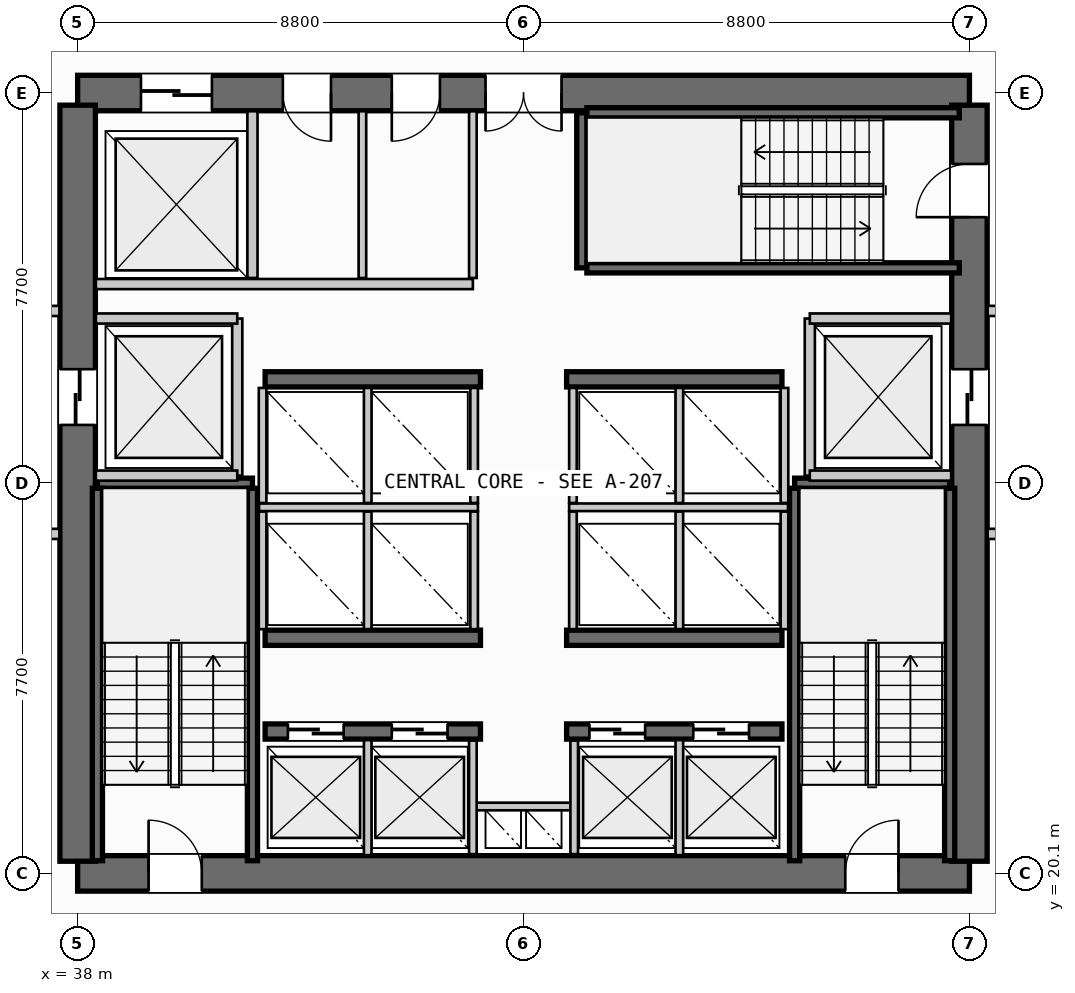
"""IFC4 building model, lengths in metres.
Left out: names, types, materials, properties, quantities, classifications, styles, units other than length and angle.
Written with IfcOpenShell. Run it as: python <this file> out.ifc"""

import sys

from ifc_helpers import new_model, si_unit, direction, frame, frame_2d, origin, place, context, subcontext, project, spatial, rectangle, extrude, source, transform, mapped, element, fill, save


model = new_model("IFC4")
c1 = context("Model", 3, precision=1e-05, world=origin(), true_north=direction((0.0, 1.0)))
c2 = subcontext(c1, "Body", "Model", "MODEL_VIEW")
j1 = project(units=[si_unit("LENGTHUNIT", "METRE"), si_unit("PLANEANGLEUNIT", "RADIAN")], contexts=[c1])
p1 = place(None, origin())
s1 = spatial("IfcSite", under=j1, at=p1, CompositionType="ELEMENT")
p2 = place(p1, origin())
s2 = spatial("IfcBuilding", under=s1, at=p2, CompositionType="ELEMENT")
p3 = place(p2, frame((0.0, 0.0, 44.8)))
s3 = spatial("IfcBuildingStorey", under=s2, at=p3, CompositionType="ELEMENT", Elevation=44.8)
p4 = place(p3, frame((38.0, 20.1, 0.0), z_axis=(0.0, 0.0, 1.0), x_axis=(1.0, 0.0, 0.0)))
e1 = element("IfcWall", 1, at=p4, inside=s3, PredefinedType="SHEAR", context=c2, shape_type="SweptSolid", body=[
    extrude(rectangle(XDim=17.6, YDim=0.7, at=frame_2d((8.8, 0.0))), origin(), (0.0, 0.0, 1.0), 3.55),
])
p5 = place(p4, frame((1.4, 0.0, 0.0)))
e2 = element("IfcOpeningElement", 2, at=p5, cuts=e1, PredefinedType="OPENING", context=c2, shape_type="SweptSolid", body=[
    extrude(rectangle(XDim=1.05, YDim=2.15, at=frame_2d((0.525, 1.075))), frame((0.0, 0.36, 0.0), z_axis=(0.0, -1.0, 0.0), x_axis=(1.0, 0.0, 0.0)), (0.0, 0.0, 1.0), 0.72),
])
p6 = place(p4, frame((15.15, 0.0, 0.0)))
e3 = element("IfcOpeningElement", 3, at=p6, cuts=e1, PredefinedType="OPENING", context=c2, shape_type="SweptSolid", body=[
    extrude(rectangle(XDim=1.05, YDim=2.15, at=frame_2d((0.525, 1.075))), frame((0.0, 0.36, 0.0), z_axis=(0.0, -1.0, 0.0), x_axis=(1.0, 0.0, 0.0)), (0.0, 0.0, 1.0), 0.72),
])
p7 = place(p3, frame((55.6, 35.5, 0.0), z_axis=(0.0, 0.0, 1.0), x_axis=(-1.0, 0.0, 0.0)))
e4 = element("IfcWall", 4, at=p7, inside=s3, PredefinedType="SHEAR", context=c2, shape_type="SweptSolid", body=[
    extrude(rectangle(XDim=17.6, YDim=0.7, at=frame_2d((8.8, 0.0))), origin(), (0.0, 0.0, 1.0), 3.55),
])
p8 = place(p7, frame((8.05, 0.0, 0.0)))
e5 = element("IfcOpeningElement", 5, at=p8, cuts=e4, PredefinedType="OPENING", context=c2, shape_type="SweptSolid", body=[
    extrude(rectangle(XDim=1.5, YDim=2.2, at=frame_2d((0.75, 1.1))), frame((0.0, 0.36, 0.0), z_axis=(0.0, -1.0, 0.0), x_axis=(1.0, 0.0, 0.0)), (0.0, 0.0, 1.0), 0.72),
])
p9 = place(p7, frame((14.95, 0.0, 0.0)))
e6 = element("IfcOpeningElement", 6, at=p9, cuts=e4, PredefinedType="OPENING", context=c2, shape_type="SweptSolid", body=[
    extrude(rectangle(XDim=1.4, YDim=2.3, at=frame_2d((0.7, 1.15))), frame((0.0, 0.36, 0.0), z_axis=(0.0, -1.0, 0.0), x_axis=(1.0, 0.0, 0.0)), (0.0, 0.0, 1.0), 0.72),
])
p10 = place(p7, frame((12.6, 0.0, 0.0)))
e7 = element("IfcOpeningElement", 7, at=p10, cuts=e4, PredefinedType="OPENING", context=c2, shape_type="SweptSolid", body=[
    extrude(rectangle(XDim=0.95, YDim=2.15, at=frame_2d((0.475, 1.075))), frame((0.0, 0.36, 0.0), z_axis=(0.0, -1.0, 0.0), x_axis=(1.0, 0.0, 0.0)), (0.0, 0.0, 1.0), 0.72),
])
p11 = place(p7, frame((10.45, 0.0, 0.0)))
e8 = element("IfcOpeningElement", 8, at=p11, cuts=e4, PredefinedType="OPENING", context=c2, shape_type="SweptSolid", body=[
    extrude(rectangle(XDim=0.95, YDim=2.15, at=frame_2d((0.475, 1.075))), frame((0.0, 0.36, 0.0), z_axis=(0.0, -1.0, 0.0), x_axis=(1.0, 0.0, 0.0)), (0.0, 0.0, 1.0), 0.72),
])
p12 = place(p3, frame((38.0, 35.26, 0.0), z_axis=(0.0, 0.0, 1.0), x_axis=(0.0, -1.0, 0.0)))
e9 = element("IfcWall", 9, at=p12, inside=s3, PredefinedType="SHEAR", context=c2, shape_type="SweptSolid", body=[
    extrude(rectangle(XDim=14.92, YDim=0.7, at=frame_2d((7.46, 0.0))), origin(), (0.0, 0.0, 1.0), 3.55),
])
p13 = place(p12, frame((5.21, 0.0, 0.0)))
e10 = element("IfcOpeningElement", 10, at=p13, cuts=e9, PredefinedType="OPENING", context=c2, shape_type="SweptSolid", body=[
    extrude(rectangle(XDim=1.1, YDim=2.2, at=frame_2d((0.55, 1.1))), frame((0.0, 0.36, 0.0), z_axis=(0.0, -1.0, 0.0), x_axis=(1.0, 0.0, 0.0)), (0.0, 0.0, 1.0), 0.72),
])
p14 = place(p3, frame((55.6, 20.34, 0.0), z_axis=(0.0, 0.0, 1.0), x_axis=(0.0, 1.0, 0.0)))
e11 = element("IfcWall", 11, at=p14, inside=s3, PredefinedType="SHEAR", context=c2, shape_type="SweptSolid", body=[
    extrude(rectangle(XDim=14.92, YDim=0.7, at=frame_2d((7.46, 0.0))), origin(), (0.0, 0.0, 1.0), 3.55),
])
p15 = place(p14, frame((12.71, 0.0, 0.0)))
e12 = element("IfcOpeningElement", 12, at=p15, cuts=e11, PredefinedType="OPENING", context=c2, shape_type="SweptSolid", body=[
    extrude(rectangle(XDim=1.05, YDim=2.15, at=frame_2d((0.525, 1.075))), frame((0.0, 0.36, 0.0), z_axis=(0.0, -1.0, 0.0), x_axis=(1.0, 0.0, 0.0)), (0.0, 0.0, 1.0), 0.72),
])
p16 = place(p14, frame((8.61, 0.0, 0.0)))
e13 = element("IfcOpeningElement", 13, at=p16, cuts=e11, PredefinedType="OPENING", context=c2, shape_type="SweptSolid", body=[
    extrude(rectangle(XDim=1.1, YDim=2.2, at=frame_2d((0.55, 1.1))), frame((0.0, 0.36, 0.0), z_axis=(0.0, -1.0, 0.0), x_axis=(1.0, 0.0, 0.0)), (0.0, 0.0, 1.0), 0.72),
])
p17 = place(p3, frame((41.7, 22.9, 0.0), z_axis=(0.0, 0.0, 1.0), x_axis=(1.0, 0.0, 0.0)))
e14 = element("IfcWall", 14, at=p17, inside=s3, PredefinedType="SHEAR", context=c2, shape_type="SweptSolid", body=[
    extrude(rectangle(XDim=4.25, YDim=0.3, at=frame_2d((2.125, 0.0))), origin(), (0.0, 0.0, 1.0), 3.55),
])
p18 = place(p17, frame((0.45, 0.0, 0.0)))
e15 = element("IfcOpeningElement", 15, at=p18, cuts=e14, PredefinedType="OPENING", context=c2, shape_type="SweptSolid", body=[
    extrude(rectangle(XDim=1.1, YDim=2.2, at=frame_2d((0.55, 1.1))), frame((0.0, 0.16, 0.0), z_axis=(0.0, -1.0, 0.0), x_axis=(1.0, 0.0, 0.0)), (0.0, 0.0, 1.0), 0.32),
])
p19 = place(p17, frame((2.5, 0.0, 0.0)))
e16 = element("IfcOpeningElement", 16, at=p19, cuts=e14, PredefinedType="OPENING", context=c2, shape_type="SweptSolid", body=[
    extrude(rectangle(XDim=1.1, YDim=2.2, at=frame_2d((0.55, 1.1))), frame((0.0, 0.16, 0.0), z_axis=(0.0, -1.0, 0.0), x_axis=(1.0, 0.0, 0.0)), (0.0, 0.0, 1.0), 0.32),
])
p20 = place(p3, frame((47.65, 22.9, 0.0), z_axis=(0.0, 0.0, 1.0), x_axis=(1.0, 0.0, 0.0)))
e17 = element("IfcWall", 17, at=p20, inside=s3, PredefinedType="SHEAR", context=c2, shape_type="SweptSolid", body=[
    extrude(rectangle(XDim=4.25, YDim=0.3, at=frame_2d((2.125, 0.0))), origin(), (0.0, 0.0, 1.0), 3.55),
])
p21 = place(p20, frame((0.45, 0.0, 0.0)))
e18 = element("IfcOpeningElement", 18, at=p21, cuts=e17, PredefinedType="OPENING", context=c2, shape_type="SweptSolid", body=[
    extrude(rectangle(XDim=1.1, YDim=2.2, at=frame_2d((0.55, 1.1))), frame((0.0, 0.16, 0.0), z_axis=(0.0, -1.0, 0.0), x_axis=(1.0, 0.0, 0.0)), (0.0, 0.0, 1.0), 0.32),
])
p22 = place(p20, frame((2.5, 0.0, 0.0)))
e19 = element("IfcOpeningElement", 19, at=p22, cuts=e17, PredefinedType="OPENING", context=c2, shape_type="SweptSolid", body=[
    extrude(rectangle(XDim=1.1, YDim=2.2, at=frame_2d((0.55, 1.1))), frame((0.0, 0.16, 0.0), z_axis=(0.0, -1.0, 0.0), x_axis=(1.0, 0.0, 0.0)), (0.0, 0.0, 1.0), 0.32),
])
for number, where, z_axis, x_axis in (
    (20, (41.7, 24.75, 0.0), (0.0, 0.0, 1.0), (1.0, 0.0, 0.0)),
    (21, (47.65, 24.75, 0.0), (0.0, 0.0, 1.0), (1.0, 0.0, 0.0)),
    (22, (41.7, 29.85, 0.0), (0.0, 0.0, 1.0), (1.0, 0.0, 0.0)),
    (23, (47.65, 29.85, 0.0), (0.0, 0.0, 1.0), (1.0, 0.0, 0.0)),
):
    element("IfcWall", number, at=place(p3, frame(where, z_axis=z_axis, x_axis=x_axis)), inside=s3, PredefinedType="SHEAR", context=c2, shape_type="SweptSolid", body=[
        extrude(rectangle(XDim=4.25, YDim=0.3, at=frame_2d((2.125, 0.0))), origin(), (0.0, 0.0, 1.0), 3.55),
    ])
p23 = place(p3, frame((38.39, 27.8, 0.0), z_axis=(0.0, 0.0, 1.0), x_axis=(1.0, 0.0, 0.0)))
e24 = element("IfcWall", 24, at=p23, inside=s3, PredefinedType="SHEAR", context=c2, shape_type="SweptSolid", body=[
    extrude(rectangle(XDim=3.06, YDim=0.2, at=frame_2d((1.53, 0.0))), origin(), (0.0, 0.0, 1.0), 3.55),
])
for number, where, z_axis, x_axis in (
    (25, (41.45, 27.7, 0.0), (0.0, 0.0, 1.0), (0.0, -1.0, 0.0)),
    (26, (38.39, 20.35, 0.0), (0.0, 0.0, 1.0), (0.0, 1.0, 0.0)),
):
    element("IfcWall", number, at=place(p3, frame(where, z_axis=z_axis, x_axis=x_axis)), inside=s3, PredefinedType="SHEAR", context=c2, shape_type="SweptSolid", body=[
        extrude(rectangle(XDim=7.35, YDim=0.2, at=frame_2d((3.675, 0.0))), origin(), (0.0, 0.0, 1.0), 3.55),
    ])
p24 = place(p3, frame((52.15, 27.8, 0.0), z_axis=(0.0, 0.0, 1.0), x_axis=(1.0, 0.0, 0.0)))
e27 = element("IfcWall", 27, at=p24, inside=s3, PredefinedType="SHEAR", context=c2, shape_type="SweptSolid", body=[
    extrude(rectangle(XDim=3.06, YDim=0.2, at=frame_2d((1.53, 0.0))), origin(), (0.0, 0.0, 1.0), 3.55),
])
for number, where, z_axis, x_axis in (
    (28, (55.21, 27.7, 0.0), (0.0, 0.0, 1.0), (0.0, -1.0, 0.0)),
    (29, (52.15, 20.35, 0.0), (0.0, 0.0, 1.0), (0.0, 1.0, 0.0)),
):
    element("IfcWall", number, at=place(p3, frame(where, z_axis=z_axis, x_axis=x_axis)), inside=s3, PredefinedType="SHEAR", context=c2, shape_type="SweptSolid", body=[
        extrude(rectangle(XDim=7.35, YDim=0.2, at=frame_2d((3.675, 0.0))), origin(), (0.0, 0.0, 1.0), 3.55),
    ])
p25 = place(p3, frame((47.95, 32.05, 0.0), z_axis=(0.0, 0.0, 1.0), x_axis=(0.0, 1.0, 0.0)))
e30 = element("IfcWall", 30, at=p25, inside=s3, PredefinedType="SHEAR", context=c2, shape_type="SweptSolid", body=[
    extrude(rectangle(XDim=3.06, YDim=0.2, at=frame_2d((1.53, 0.0))), origin(), (0.0, 0.0, 1.0), 3.55),
])
for number, where, z_axis, x_axis in (
    (31, (48.05, 35.11, 0.0), (0.0, 0.0, 1.0), (1.0, 0.0, 0.0)),
    (32, (55.4, 32.05, 0.0), (0.0, 0.0, 1.0), (-1.0, 0.0, 0.0)),
):
    element("IfcWall", number, at=place(p3, frame(where, z_axis=z_axis, x_axis=x_axis)), inside=s3, PredefinedType="SHEAR", context=c2, shape_type="SweptSolid", body=[
        extrude(rectangle(XDim=7.35, YDim=0.2, at=frame_2d((3.675, 0.0))), origin(), (0.0, 0.0, 1.0), 3.55),
    ])
p26 = place(p3, frame((45.8, 21.42, 0.0), z_axis=(0.0, 0.0, 1.0), x_axis=(1.0, 0.0, 0.0)))
e33 = element("IfcWall", 33, at=p26, inside=s3, PredefinedType="PARTITIONING", context=c2, shape_type="SweptSolid", body=[
    extrude(rectangle(XDim=2.0, YDim=0.15, at=frame_2d((1.0, 0.0))), origin(), (0.0, 0.0, 1.0), 2.785),
])
for number, where, z_axis, x_axis in (
    (34, (45.8, 20.48, 0.0), (0.0, 0.0, 1.0), (0.0, 1.0, 0.0)),
    (35, (47.8, 20.48, 0.0), (0.0, 0.0, 1.0), (0.0, 1.0, 0.0)),
):
    element("IfcWall", number, at=place(p3, frame(where, z_axis=z_axis, x_axis=x_axis)), inside=s3, PredefinedType="PARTITIONING", context=c2, shape_type="SweptSolid", body=[
        extrude(rectangle(XDim=2.24, YDim=0.15, at=frame_2d((1.12, 0.0))), origin(), (0.0, 0.0, 1.0), 2.785),
    ])
p27 = place(p3, frame((41.15, 27.95, 0.0), z_axis=(0.0, 0.0, 1.0), x_axis=(0.0, 1.0, 0.0)))
e36 = element("IfcWall", 36, at=p27, inside=s3, PredefinedType="PARTITIONING", context=c2, shape_type="SweptSolid", body=[
    extrude(rectangle(XDim=3.1, YDim=0.2, at=frame_2d((1.55, 0.0))), origin(), (0.0, 0.0, 1.0), 2.785),
])
for number, where, z_axis, x_axis in (
    (37, (38.36, 27.95, 0.0), (0.0, 0.0, 1.0), (1.0, 0.0, 0.0)),
    (38, (38.36, 31.05, 0.0), (0.0, 0.0, 1.0), (1.0, 0.0, 0.0)),
):
    element("IfcWall", number, at=place(p3, frame(where, z_axis=z_axis, x_axis=x_axis)), inside=s3, PredefinedType="PARTITIONING", context=c2, shape_type="SweptSolid", body=[
        extrude(rectangle(XDim=2.79, YDim=0.2, at=frame_2d((1.395, 0.0))), origin(), (0.0, 0.0, 1.0), 2.785),
    ])
for number, where, z_axis, x_axis in (
    (39, (34.5, 26.8, 0.0), (0.0, 0.0, 1.0), (1.0, 0.0, 0.0)),
    (40, (34.5, 31.2, 0.0), (0.0, 0.0, 1.0), (1.0, 0.0, 0.0)),
):
    element("IfcWall", number, at=place(p3, frame(where, z_axis=z_axis, x_axis=x_axis)), inside=s3, PredefinedType="PARTITIONING", context=c2, shape_type="SweptSolid", body=[
        extrude(rectangle(XDim=3.14, YDim=0.2, at=frame_2d((1.57, 0.0))), origin(), (0.0, 0.0, 1.0), 2.785),
    ])
p28 = place(p3, frame((52.45, 27.95, 0.0), z_axis=(0.0, 0.0, 1.0), x_axis=(0.0, 1.0, 0.0)))
e41 = element("IfcWall", 41, at=p28, inside=s3, PredefinedType="PARTITIONING", context=c2, shape_type="SweptSolid", body=[
    extrude(rectangle(XDim=3.1, YDim=0.2, at=frame_2d((1.55, 0.0))), origin(), (0.0, 0.0, 1.0), 2.785),
])
for number, where, z_axis, x_axis in (
    (42, (52.45, 27.95, 0.0), (0.0, 0.0, 1.0), (1.0, 0.0, 0.0)),
    (43, (52.45, 31.05, 0.0), (0.0, 0.0, 1.0), (1.0, 0.0, 0.0)),
):
    element("IfcWall", number, at=place(p3, frame(where, z_axis=z_axis, x_axis=x_axis)), inside=s3, PredefinedType="PARTITIONING", context=c2, shape_type="SweptSolid", body=[
        extrude(rectangle(XDim=2.79, YDim=0.2, at=frame_2d((1.395, 0.0))), origin(), (0.0, 0.0, 1.0), 2.785),
    ])
for number, where, z_axis, x_axis in (
    (44, (55.96, 26.8, 0.0), (0.0, 0.0, 1.0), (1.0, 0.0, 0.0)),
    (45, (55.96, 31.2, 0.0), (0.0, 0.0, 1.0), (1.0, 0.0, 0.0)),
):
    element("IfcWall", number, at=place(p3, frame(where, z_axis=z_axis, x_axis=x_axis)), inside=s3, PredefinedType="PARTITIONING", context=c2, shape_type="SweptSolid", body=[
        extrude(rectangle(XDim=3.14, YDim=0.2, at=frame_2d((1.57, 0.0))), origin(), (0.0, 0.0, 1.0), 2.785),
    ])
for number, where, z_axis, x_axis in (
    (46, (43.725, 20.46, 0.0), (0.0, 0.0, 1.0), (0.0, 1.0, 0.0)),
    (47, (49.875, 20.46, 0.0), (0.0, 0.0, 1.0), (0.0, 1.0, 0.0)),
):
    element("IfcWall", number, at=place(p3, frame(where, z_axis=z_axis, x_axis=x_axis)), inside=s3, PredefinedType="PARTITIONING", context=c2, shape_type="SweptSolid", body=[
        extrude(rectangle(XDim=2.27, YDim=0.15, at=frame_2d((1.135, 0.0))), origin(), (0.0, 0.0, 1.0), 2.785),
    ])
p29 = place(p3, frame((41.58, 27.325, 0.0), z_axis=(0.0, 0.0, 1.0), x_axis=(1.0, 0.0, 0.0)))
e48 = element("IfcWall", 48, at=p29, inside=s3, PredefinedType="PARTITIONING", context=c2, shape_type="SweptSolid", body=[
    extrude(rectangle(XDim=4.32, YDim=0.15, at=frame_2d((2.16, 0.0))), origin(), (0.0, 0.0, 1.0), 2.785),
])
p30 = place(p3, frame((47.7, 27.325, 0.0), z_axis=(0.0, 0.0, 1.0), x_axis=(1.0, 0.0, 0.0)))
e49 = element("IfcWall", 49, at=p30, inside=s3, PredefinedType="PARTITIONING", context=c2, shape_type="SweptSolid", body=[
    extrude(rectangle(XDim=4.32, YDim=0.15, at=frame_2d((2.16, 0.0))), origin(), (0.0, 0.0, 1.0), 2.785),
])
for number, where, z_axis, x_axis in (
    (50, (41.65, 24.92, 0.0), (0.0, 0.0, 1.0), (0.0, 1.0, 0.0)),
    (51, (43.725, 24.92, 0.0), (0.0, 0.0, 1.0), (0.0, 1.0, 0.0)),
    (52, (45.825, 24.92, 0.0), (0.0, 0.0, 1.0), (0.0, 1.0, 0.0)),
    (53, (47.775, 24.92, 0.0), (0.0, 0.0, 1.0), (0.0, 1.0, 0.0)),
    (54, (49.875, 24.92, 0.0), (0.0, 0.0, 1.0), (0.0, 1.0, 0.0)),
    (55, (51.95, 24.92, 0.0), (0.0, 0.0, 1.0), (0.0, 1.0, 0.0)),
):
    element("IfcWall", number, at=place(p3, frame(where, z_axis=z_axis, x_axis=x_axis)), inside=s3, PredefinedType="PARTITIONING", context=c2, shape_type="SweptSolid", body=[
        extrude(rectangle(XDim=2.32, YDim=0.15, at=frame_2d((1.16, 0.0))), origin(), (0.0, 0.0, 1.0), 2.785),
    ])
for number, where, z_axis, x_axis in (
    (56, (41.65, 27.41, 0.0), (0.0, 0.0, 1.0), (0.0, 1.0, 0.0)),
    (57, (43.725, 27.41, 0.0), (0.0, 0.0, 1.0), (0.0, 1.0, 0.0)),
    (58, (45.825, 27.41, 0.0), (0.0, 0.0, 1.0), (0.0, 1.0, 0.0)),
    (59, (47.775, 27.41, 0.0), (0.0, 0.0, 1.0), (0.0, 1.0, 0.0)),
    (60, (49.875, 27.41, 0.0), (0.0, 0.0, 1.0), (0.0, 1.0, 0.0)),
    (61, (51.95, 27.41, 0.0), (0.0, 0.0, 1.0), (0.0, 1.0, 0.0)),
):
    element("IfcWall", number, at=place(p3, frame(where, z_axis=z_axis, x_axis=x_axis)), inside=s3, PredefinedType="PARTITIONING", context=c2, shape_type="SweptSolid", body=[
        extrude(rectangle(XDim=2.27, YDim=0.15, at=frame_2d((1.135, 0.0))), origin(), (0.0, 0.0, 1.0), 2.785),
    ])
p31 = place(p3, frame((41.45, 31.85, 0.0), z_axis=(0.0, 0.0, 1.0), x_axis=(0.0, 1.0, 0.0)))
e62 = element("IfcWall", 62, at=p31, inside=s3, PredefinedType="PARTITIONING", context=c2, shape_type="SweptSolid", body=[
    extrude(rectangle(XDim=3.29, YDim=0.2, at=frame_2d((1.645, 0.0))), origin(), (0.0, 0.0, 1.0), 2.785),
])
p32 = place(p3, frame((38.36, 31.73, 0.0), z_axis=(0.0, 0.0, 1.0), x_axis=(1.0, 0.0, 0.0)))
e63 = element("IfcWall", 63, at=p32, inside=s3, PredefinedType="PARTITIONING", context=c2, shape_type="SweptSolid", body=[
    extrude(rectangle(XDim=7.44, YDim=0.2, at=frame_2d((3.72, 0.0))), origin(), (0.0, 0.0, 1.0), 2.785),
])
p33 = place(p3, frame((45.8, 31.85, 0.0), z_axis=(0.0, 0.0, 1.0), x_axis=(0.0, 1.0, 0.0)))
e64 = element("IfcWall", 64, at=p33, inside=s3, PredefinedType="PARTITIONING", context=c2, shape_type="SweptSolid", body=[
    extrude(rectangle(XDim=3.29, YDim=0.15, at=frame_2d((1.645, 0.0))), origin(), (0.0, 0.0, 1.0), 2.785),
])
p34 = place(p3, frame((43.62, 31.85, 0.0), z_axis=(0.0, 0.0, 1.0), x_axis=(0.0, 1.0, 0.0)))
e65 = element("IfcWall", 65, at=p34, inside=s3, PredefinedType="PLUMBINGWALL", context=c2, shape_type="SweptSolid", body=[
    extrude(rectangle(XDim=3.29, YDim=0.15, at=frame_2d((1.645, 0.0))), origin(), (0.0, 0.0, 1.0), 2.785),
])
m1 = source(origin(), c2, "Body", "SweptSolid", [
    extrude(rectangle(XDim=1.05, YDim=2.15, at=frame_2d((0.525, 1.075))), frame((0.0, 0.025, 0.0), z_axis=(0.0, -1.0, 0.0), x_axis=(1.0, 0.0, 0.0)), (0.0, 0.0, 1.0), 0.05),
])
p35 = place(p5, origin())
e66 = element("IfcDoor", 66, at=p35, inside=s3, OperationType="SINGLE_SWING_LEFT", PredefinedType="DOOR", context=c2, shape_type="MappedRepresentation", body=[
    mapped(m1, transform((0.0, 0.0, 0.0), scale=1.0)),
])
fill(e2, e66)
p36 = place(p6, origin())
e67 = element("IfcDoor", 67, at=p36, inside=s3, OperationType="SINGLE_SWING_RIGHT", PredefinedType="DOOR", context=c2, shape_type="MappedRepresentation", body=[
    mapped(m1, transform((0.0, 0.0, 0.0), scale=1.0)),
])
fill(e3, e67)
p37 = place(p15, origin())
e68 = element("IfcDoor", 68, at=p37, inside=s3, OperationType="SINGLE_SWING_LEFT", PredefinedType="DOOR", context=c2, shape_type="MappedRepresentation", body=[
    mapped(m1, transform((0.0, 0.0, 0.0), scale=1.0)),
])
fill(e12, e68)
m2 = source(origin(), c2, "Body", "SweptSolid", [
    extrude(rectangle(XDim=1.5, YDim=2.2, at=frame_2d((0.75, 1.1))), frame((0.0, 0.025, 0.0), z_axis=(0.0, -1.0, 0.0), x_axis=(1.0, 0.0, 0.0)), (0.0, 0.0, 1.0), 0.05),
])
p38 = place(p8, origin())
e69 = element("IfcDoor", 69, at=p38, inside=s3, OperationType="DOUBLE_DOOR_SINGLE_SWING", PredefinedType="DOOR", context=c2, shape_type="MappedRepresentation", body=[
    mapped(m2, transform((0.0, 0.0, 0.0), scale=1.0)),
])
fill(e5, e69)
m3 = source(origin(), c2, "Body", "SweptSolid", [
    extrude(rectangle(XDim=1.1, YDim=2.2, at=frame_2d((0.55, 1.1))), frame((0.0, 0.025, 0.0), z_axis=(0.0, -1.0, 0.0), x_axis=(1.0, 0.0, 0.0)), (0.0, 0.0, 1.0), 0.05),
])
p39 = place(p13, origin())
e70 = element("IfcDoor", 70, at=p39, inside=s3, OperationType="SLIDING_TO_LEFT", PredefinedType="DOOR", context=c2, shape_type="MappedRepresentation", body=[
    mapped(m3, transform((0.0, 0.0, 0.0), scale=1.0)),
])
fill(e10, e70)
p40 = place(p16, origin())
e71 = element("IfcDoor", 71, at=p40, inside=s3, OperationType="SLIDING_TO_RIGHT", PredefinedType="DOOR", context=c2, shape_type="MappedRepresentation", body=[
    mapped(m3, transform((0.0, 0.0, 0.0), scale=1.0)),
])
fill(e13, e71)
p41 = place(p18, origin())
e72 = element("IfcDoor", 72, at=p41, inside=s3, OperationType="SLIDING_TO_LEFT", PredefinedType="DOOR", context=c2, shape_type="MappedRepresentation", body=[
    mapped(m3, transform((0.0, 0.0, 0.0), scale=1.0)),
])
fill(e15, e72)
p42 = place(p19, origin())
e73 = element("IfcDoor", 73, at=p42, inside=s3, OperationType="SLIDING_TO_LEFT", PredefinedType="DOOR", context=c2, shape_type="MappedRepresentation", body=[
    mapped(m3, transform((0.0, 0.0, 0.0), scale=1.0)),
])
fill(e16, e73)
p43 = place(p21, origin())
e74 = element("IfcDoor", 74, at=p43, inside=s3, OperationType="SLIDING_TO_LEFT", PredefinedType="DOOR", context=c2, shape_type="MappedRepresentation", body=[
    mapped(m3, transform((0.0, 0.0, 0.0), scale=1.0)),
])
fill(e18, e74)
p44 = place(p22, origin())
e75 = element("IfcDoor", 75, at=p44, inside=s3, OperationType="SLIDING_TO_LEFT", PredefinedType="DOOR", context=c2, shape_type="MappedRepresentation", body=[
    mapped(m3, transform((0.0, 0.0, 0.0), scale=1.0)),
])
fill(e19, e75)
m4 = source(origin(), c2, "Body", "SweptSolid", [
    extrude(rectangle(XDim=1.4, YDim=2.3, at=frame_2d((0.7, 1.15))), frame((0.0, 0.025, 0.0), z_axis=(0.0, -1.0, 0.0), x_axis=(1.0, 0.0, 0.0)), (0.0, 0.0, 1.0), 0.05),
])
p45 = place(p9, origin())
e76 = element("IfcDoor", 76, at=p45, inside=s3, OperationType="SLIDING_TO_RIGHT", PredefinedType="DOOR", context=c2, shape_type="MappedRepresentation", body=[
    mapped(m4, transform((0.0, 0.0, 0.0), scale=1.0)),
])
fill(e6, e76)
m5 = source(origin(), c2, "Body", "SweptSolid", [
    extrude(rectangle(XDim=0.95, YDim=2.15, at=frame_2d((0.475, 1.075))), frame((0.0, 0.025, 0.0), z_axis=(0.0, -1.0, 0.0), x_axis=(1.0, 0.0, 0.0)), (0.0, 0.0, 1.0), 0.05),
])
p46 = place(p10, origin())
e77 = element("IfcDoor", 77, at=p46, inside=s3, OperationType="SINGLE_SWING_LEFT", PredefinedType="DOOR", context=c2, shape_type="MappedRepresentation", body=[
    mapped(m5, transform((0.0, 0.0, 0.0), scale=1.0)),
])
fill(e7, e77)
p47 = place(p11, origin())
e78 = element("IfcDoor", 78, at=p47, inside=s3, OperationType="SINGLE_SWING_RIGHT", PredefinedType="DOOR", context=c2, shape_type="MappedRepresentation", body=[
    mapped(m5, transform((0.0, 0.0, 0.0), scale=1.0)),
])
fill(e8, e78)
save(model, sys.argv[1])
